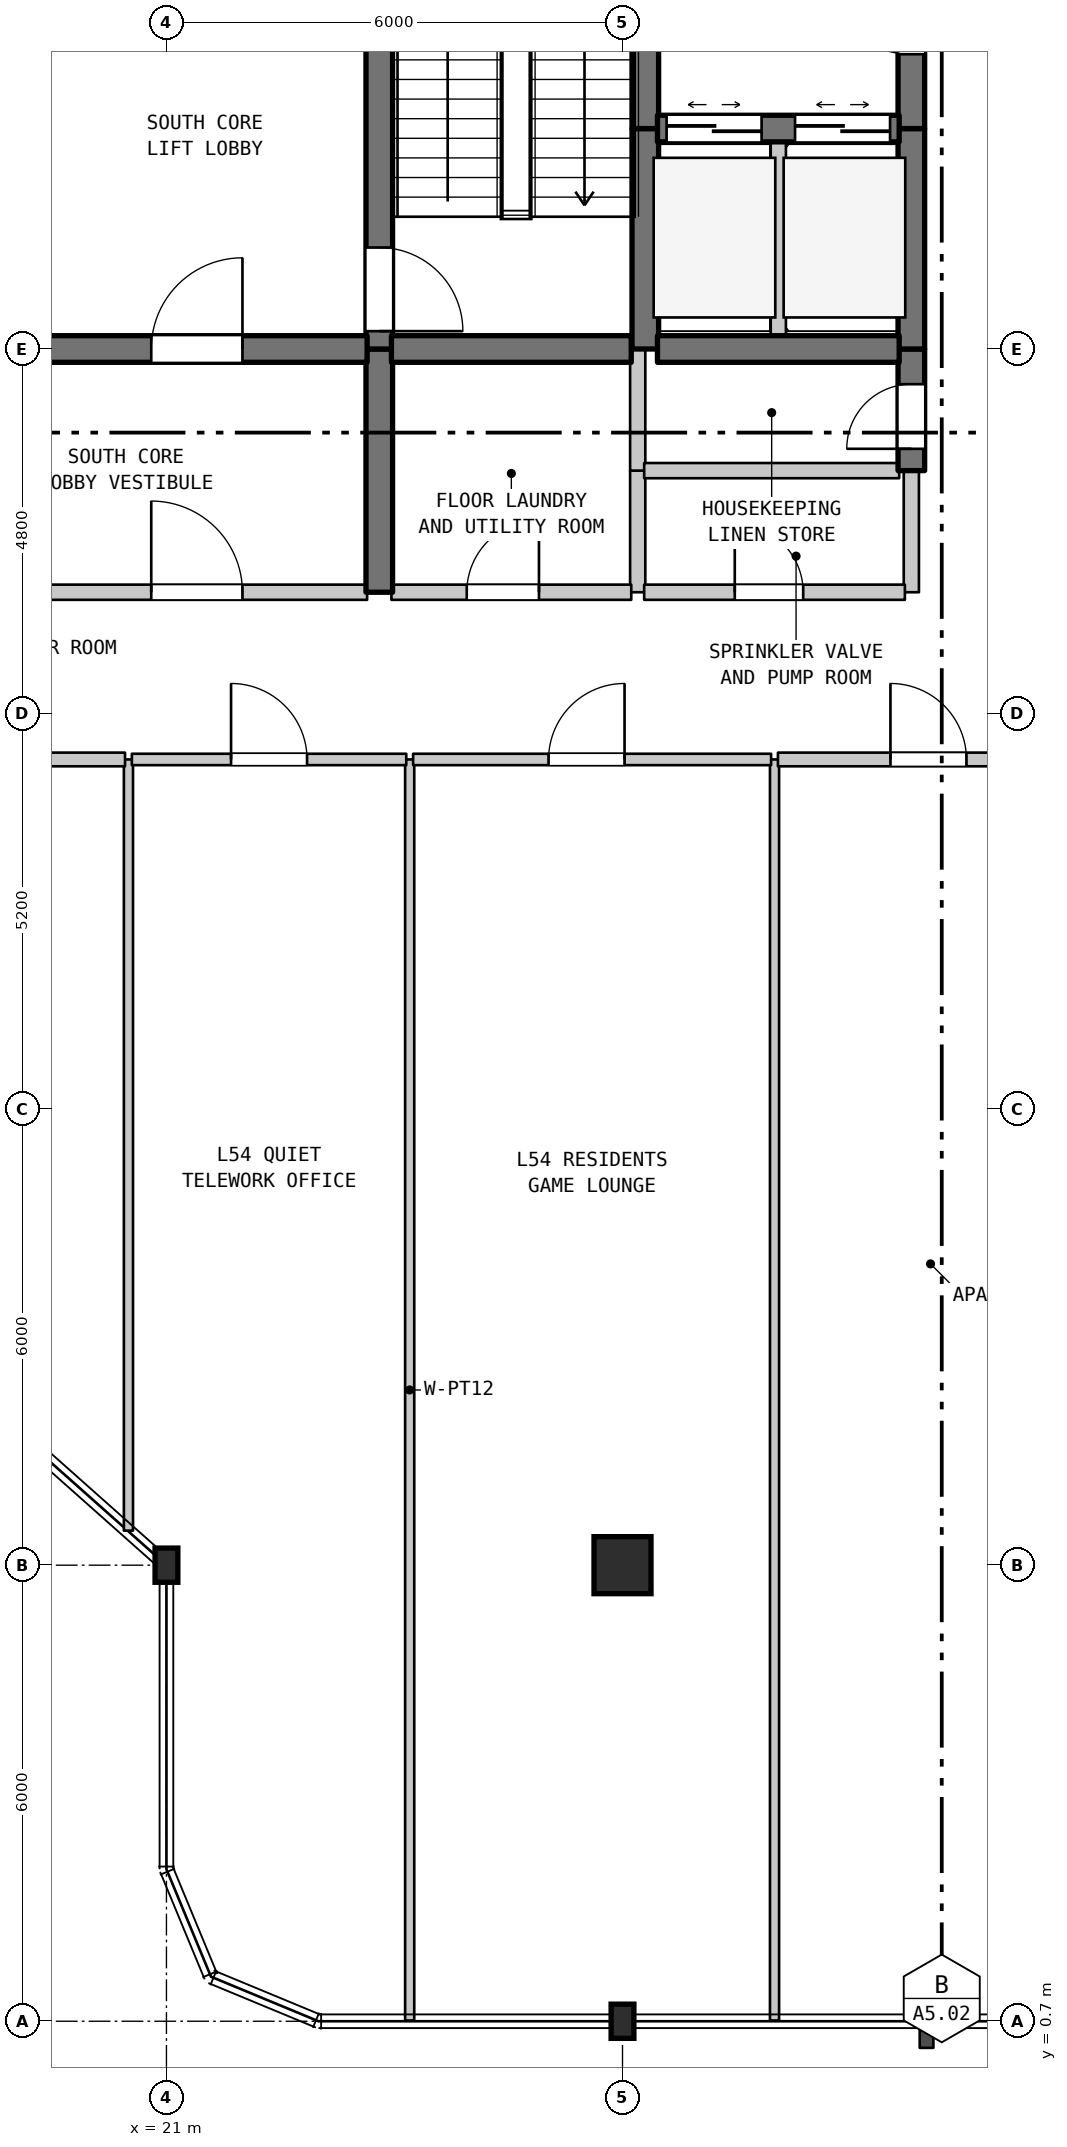
"""IFC4 building model, lengths in metres.
Left out: names, types, materials, properties, quantities, classifications, styles, units other than length and angle.
Written with IfcOpenShell. Run it as: python <this file> out.ifc"""

import sys

from ifc_helpers import new_model, si_unit, direction, frame, frame_2d, origin, origin_2d, place, context, subcontext, project, spatial, rectangle, i_section, extrude, element, fill, save


model = new_model("IFC4")
c1 = context("Model", 3, precision=1e-05, world=origin(), true_north=direction((0.0, 1.0)))
c2 = subcontext(c1, "Body", "Model", "MODEL_VIEW")
j1 = project(units=[si_unit("LENGTHUNIT", "METRE"), si_unit("PLANEANGLEUNIT", "RADIAN")], contexts=[c1])
p1 = place(None, origin())
s1 = spatial("IfcSite", under=j1, at=p1, CompositionType="ELEMENT")
p2 = place(p1, origin())
s2 = spatial("IfcBuilding", under=s1, at=p2, CompositionType="ELEMENT")
p3 = place(p2, frame((0.0, 0.0, 218.0)))
s3 = spatial("IfcBuildingStorey", under=s2, at=p3, CompositionType="ELEMENT", Elevation=218.0)
for number, where, z_axis, x_axis in (
    (1, (21.0, 6.7, 0.0), (0.0, 0.0, 1.0), (1.0, 0.0, 0.0)),
    (2, (27.0, 0.7, 0.0), (0.0, 0.0, 1.0), (1.0, 0.0, 0.0)),
):
    element("IfcColumn", number, at=place(p3, frame(where, z_axis=z_axis, x_axis=x_axis)), inside=s3, PredefinedType="COLUMN", context=c2, shape_type="SweptSolid", body=[
        extrude(i_section(OverallWidth=0.3, OverallDepth=0.45, WebThickness=0.014, FlangeThickness=0.026, FilletRadius=0.027, at=origin_2d()), origin(), (0.0, 0.0, 1.0), 4.8),
    ])
p4 = place(p3, frame((27.0, 6.7, 0.0), z_axis=(0.0, 0.0, 1.0), x_axis=(1.0, 0.0, 0.0)))
e3 = element("IfcColumn", 3, at=p4, inside=s3, PredefinedType="COLUMN", context=c2, shape_type="SweptSolid", body=[
    extrude(rectangle(XDim=0.75, YDim=0.75, at=origin_2d()), origin(), (0.0, 0.0, 1.0), 4.8),
])
p5 = place(p3, frame((20.5, 7.154, 0.0), z_axis=(0.0, 0.0, 1.0), x_axis=(0.0, 1.0, 0.0)))
e4 = element("IfcWall", 4, at=p5, inside=s3, PredefinedType="PARTITIONING", context=c2, shape_type="SweptSolid", body=[
    extrude(rectangle(XDim=10.146, YDim=0.12, at=frame_2d((5.073, 0.0))), origin(), (0.0, 0.0, 1.0), 4.49),
])
p6 = place(p3, frame((23.8, 19.5, 0.0), z_axis=(0.0, 0.0, 1.0), x_axis=(0.0, 1.0, 0.0)))
e5 = element("IfcWall", 5, at=p6, inside=s3, PredefinedType="SHEAR", context=c2, shape_type="SweptSolid", body=[
    extrude(rectangle(XDim=3.2, YDim=0.35, at=frame_2d((1.6, 0.0))), origin(), (0.0, 0.0, 1.0), 4.49),
])
p7 = place(p3, frame((23.8, 22.7, 0.0), z_axis=(0.0, 0.0, 1.0), x_axis=(0.0, 1.0, 0.0)))
e6 = element("IfcWall", 6, at=p7, inside=s3, PredefinedType="SHEAR", context=c2, shape_type="SweptSolid", body=[
    extrude(rectangle(XDim=5.5, YDim=0.35, at=frame_2d((2.75, 0.0))), origin(), (0.0, 0.0, 1.0), 4.49),
])
p8 = place(p7, frame((0.235, 0.0, 0.0)))
e7 = element("IfcOpeningElement", 7, at=p8, cuts=e6, PredefinedType="OPENING", context=c2, shape_type="SweptSolid", body=[
    extrude(rectangle(XDim=1.1, YDim=2.15, at=frame_2d((0.55, 1.075))), frame((0.0, 0.185, 0.0), z_axis=(0.0, -1.0, 0.0), x_axis=(1.0, 0.0, 0.0)), (0.0, 0.0, 1.0), 0.37),
])
p9 = place(p3, frame((24.2, 0.71, 0.0), z_axis=(0.0, 0.0, 1.0), x_axis=(0.0, 1.0, 0.0)))
e8 = element("IfcWall", 8, at=p9, inside=s3, PredefinedType="PARTITIONING", context=c2, shape_type="SweptSolid", body=[
    extrude(rectangle(XDim=16.59, YDim=0.12, at=frame_2d((8.295, 0.0))), origin(), (0.0, 0.0, 1.0), 4.49),
])
p10 = place(p3, frame((27.2, 19.5, 0.0), z_axis=(0.0, 0.0, 1.0), x_axis=(0.0, 1.0, 0.0)))
e9 = element("IfcWall", 9, at=p10, inside=s3, PredefinedType="STANDARD", context=c2, shape_type="SweptSolid", body=[
    extrude(rectangle(XDim=1.6, YDim=0.2, at=frame_2d((0.8, 0.0))), origin(), (0.0, 0.0, 1.0), 4.49),
])
p11 = place(p3, frame((27.2, 21.1, 0.0), z_axis=(0.0, 0.0, 1.0), x_axis=(0.0, 1.0, 0.0)))
e10 = element("IfcWall", 10, at=p11, inside=s3, PredefinedType="STANDARD", context=c2, shape_type="SweptSolid", body=[
    extrude(rectangle(XDim=1.6, YDim=0.2, at=frame_2d((0.8, 0.0))), origin(), (0.0, 0.0, 1.0), 4.49),
])
p12 = place(p3, frame((27.3, 22.7, 0.0), z_axis=(0.0, 0.0, 1.0), x_axis=(0.0, 1.0, 0.0)))
e11 = element("IfcWall", 11, at=p12, inside=s3, PredefinedType="SHEAR", context=c2, shape_type="SweptSolid", body=[
    extrude(rectangle(XDim=2.9, YDim=0.35, at=frame_2d((1.45, 0.0))), origin(), (0.0, 0.0, 1.0), 4.49),
])
p13 = place(p3, frame((27.3, 25.6, 0.0), z_axis=(0.0, 0.0, 1.0), x_axis=(0.0, 1.0, 0.0)))
e12 = element("IfcWall", 12, at=p13, inside=s3, PredefinedType="SHEAR", context=c2, shape_type="SweptSolid", body=[
    extrude(rectangle(XDim=3.3, YDim=0.35, at=frame_2d((1.65, 0.0))), origin(), (0.0, 0.0, 1.0), 4.49),
])
p14 = place(p3, frame((29.0, 0.71, 0.0), z_axis=(0.0, 0.0, 1.0), x_axis=(0.0, 1.0, 0.0)))
e13 = element("IfcWall", 13, at=p14, inside=s3, PredefinedType="PARTITIONING", context=c2, shape_type="SweptSolid", body=[
    extrude(rectangle(XDim=16.59, YDim=0.12, at=frame_2d((8.295, 0.0))), origin(), (0.0, 0.0, 1.0), 4.49),
])
p15 = place(p3, frame((29.05, 22.7, 0.0), z_axis=(0.0, 0.0, 1.0), x_axis=(0.0, 1.0, 0.0)))
e14 = element("IfcWall", 14, at=p15, inside=s3, PredefinedType="STANDARD", context=c2, shape_type="SweptSolid", body=[
    extrude(rectangle(XDim=2.9, YDim=0.2, at=frame_2d((1.45, 0.0))), origin(), (0.0, 0.0, 1.0), 4.49),
])
p16 = place(p3, frame((30.8, 19.5, 0.0), z_axis=(0.0, 0.0, 1.0), x_axis=(0.0, 1.0, 0.0)))
e15 = element("IfcWall", 15, at=p16, inside=s3, PredefinedType="STANDARD", context=c2, shape_type="SweptSolid", body=[
    extrude(rectangle(XDim=1.6, YDim=0.2, at=frame_2d((0.8, 0.0))), origin(), (0.0, 0.0, 1.0), 4.49),
])
p17 = place(p3, frame((30.8, 21.1, 0.0), z_axis=(0.0, 0.0, 1.0), x_axis=(0.0, 1.0, 0.0)))
e16 = element("IfcWall", 16, at=p17, inside=s3, PredefinedType="SHEAR", context=c2, shape_type="SweptSolid", body=[
    extrude(rectangle(XDim=1.6, YDim=0.35, at=frame_2d((0.8, 0.0))), origin(), (0.0, 0.0, 1.0), 4.49),
])
p18 = place(p17, frame((0.287, 0.0, 0.0)))
e17 = element("IfcOpeningElement", 17, at=p18, cuts=e16, PredefinedType="OPENING", context=c2, shape_type="SweptSolid", body=[
    extrude(rectangle(XDim=0.85, YDim=2.1, at=frame_2d((0.425, 1.05))), frame((0.0, 0.185, 0.0), z_axis=(0.0, -1.0, 0.0), x_axis=(1.0, 0.0, 0.0)), (0.0, 0.0, 1.0), 0.37),
])
p19 = place(p3, frame((30.8, 22.7, 0.0), z_axis=(0.0, 0.0, 1.0), x_axis=(0.0, 1.0, 0.0)))
e18 = element("IfcWall", 18, at=p19, inside=s3, PredefinedType="SHEAR", context=c2, shape_type="SweptSolid", body=[
    extrude(rectangle(XDim=2.9, YDim=0.35, at=frame_2d((1.45, 0.0))), origin(), (0.0, 0.0, 1.0), 4.49),
])
p20 = place(p3, frame((30.8, 25.6, 0.0), z_axis=(0.0, 0.0, 1.0), x_axis=(0.0, 1.0, 0.0)))
e19 = element("IfcWall", 19, at=p20, inside=s3, PredefinedType="SHEAR", context=c2, shape_type="SweptSolid", body=[
    extrude(rectangle(XDim=3.3, YDim=0.35, at=frame_2d((1.65, 0.0))), origin(), (0.0, 0.0, 1.0), 4.49),
])
p21 = place(p20, frame((0.978, 0.0, 0.0)))
e20 = element("IfcOpeningElement", 20, at=p21, cuts=e19, PredefinedType="OPENING", context=c2, shape_type="SweptSolid", body=[
    extrude(rectangle(XDim=1.2, YDim=2.2, at=frame_2d((0.6, 1.1))), frame((0.0, 0.185, 0.0), z_axis=(0.0, -1.0, 0.0), x_axis=(1.0, 0.0, 0.0)), (0.0, 0.0, 1.0), 0.37),
])
p22 = place(p3, frame((18.595, 17.3, 0.0), z_axis=(0.0, 0.0, 1.0), x_axis=(1.0, 0.0, 0.0)))
e21 = element("IfcWall", 21, at=p22, inside=s3, PredefinedType="STANDARD", context=c2, shape_type="SweptSolid", body=[
    extrude(rectangle(XDim=1.86, YDim=0.18, at=frame_2d((0.93, 0.0))), origin(), (0.0, 0.0, 1.0), 4.49),
])
p23 = place(p3, frame((20.545, 17.3, 0.0), z_axis=(0.0, 0.0, 1.0), x_axis=(1.0, 0.0, 0.0)))
e22 = element("IfcWall", 22, at=p23, inside=s3, PredefinedType="STANDARD", context=c2, shape_type="SweptSolid", body=[
    extrude(rectangle(XDim=3.61, YDim=0.15, at=frame_2d((1.805, 0.0))), origin(), (0.0, 0.0, 1.0), 4.49),
])
p24 = place(p23, frame((1.305, 0.0, 0.0)))
e23 = element("IfcOpeningElement", 23, at=p24, cuts=e22, PredefinedType="OPENING", context=c2, shape_type="SweptSolid", body=[
    extrude(rectangle(XDim=1.0, YDim=2.15, at=frame_2d((0.5, 1.075))), frame((0.0, 0.085, 0.0), z_axis=(0.0, -1.0, 0.0), x_axis=(1.0, 0.0, 0.0)), (0.0, 0.0, 1.0), 0.17),
])
p25 = place(p3, frame((24.245, 17.3, 0.0), z_axis=(0.0, 0.0, 1.0), x_axis=(1.0, 0.0, 0.0)))
e24 = element("IfcWall", 24, at=p25, inside=s3, PredefinedType="STANDARD", context=c2, shape_type="SweptSolid", body=[
    extrude(rectangle(XDim=4.71, YDim=0.15, at=frame_2d((2.355, 0.0))), origin(), (0.0, 0.0, 1.0), 4.49),
])
p26 = place(p25, frame((1.782, 0.0, 0.0)))
e25 = element("IfcOpeningElement", 25, at=p26, cuts=e24, PredefinedType="OPENING", context=c2, shape_type="SweptSolid", body=[
    extrude(rectangle(XDim=1.0, YDim=2.15, at=frame_2d((0.5, 1.075))), frame((0.0, 0.085, 0.0), z_axis=(0.0, -1.0, 0.0), x_axis=(1.0, 0.0, 0.0)), (0.0, 0.0, 1.0), 0.17),
])
p27 = place(p3, frame((29.045, 17.3, 0.0), z_axis=(0.0, 0.0, 1.0), x_axis=(1.0, 0.0, 0.0)))
e26 = element("IfcWall", 26, at=p27, inside=s3, PredefinedType="STANDARD", context=c2, shape_type="SweptSolid", body=[
    extrude(rectangle(XDim=3.96, YDim=0.18, at=frame_2d((1.98, 0.0))), origin(), (0.0, 0.0, 1.0), 4.49),
])
p28 = place(p27, frame((1.48, 0.0, 0.0)))
e27 = element("IfcOpeningElement", 27, at=p28, cuts=e26, PredefinedType="OPENING", context=c2, shape_type="SweptSolid", body=[
    extrude(rectangle(XDim=1.0, YDim=2.15, at=frame_2d((0.5, 1.075))), frame((0.0, 0.1, 0.0), z_axis=(0.0, -1.0, 0.0), x_axis=(1.0, 0.0, 0.0)), (0.0, 0.0, 1.0), 0.2),
])
p29 = place(p3, frame((19.16, 19.5, 0.0), z_axis=(0.0, 0.0, 1.0), x_axis=(1.0, 0.0, 0.0)))
e28 = element("IfcWall", 28, at=p29, inside=s3, PredefinedType="STANDARD", context=c2, shape_type="SweptSolid", body=[
    extrude(rectangle(XDim=4.48, YDim=0.2, at=frame_2d((2.24, 0.0))), origin(), (0.0, 0.0, 1.0), 4.49),
])
p30 = place(p29, frame((1.64, 0.0, 0.0)))
e29 = element("IfcOpeningElement", 29, at=p30, cuts=e28, PredefinedType="OPENING", context=c2, shape_type="SweptSolid", body=[
    extrude(rectangle(XDim=1.2, YDim=2.2, at=frame_2d((0.6, 1.1))), frame((0.0, 0.11, 0.0), z_axis=(0.0, -1.0, 0.0), x_axis=(1.0, 0.0, 0.0)), (0.0, 0.0, 1.0), 0.22),
])
p31 = place(p3, frame((23.96, 19.5, 0.0), z_axis=(0.0, 0.0, 1.0), x_axis=(1.0, 0.0, 0.0)))
e30 = element("IfcWall", 30, at=p31, inside=s3, PredefinedType="STANDARD", context=c2, shape_type="SweptSolid", body=[
    extrude(rectangle(XDim=3.155, YDim=0.2, at=frame_2d((1.578, 0.0))), origin(), (0.0, 0.0, 1.0), 4.49),
])
p32 = place(p31, frame((0.991, 0.0, 0.0)))
e31 = element("IfcOpeningElement", 31, at=p32, cuts=e30, PredefinedType="OPENING", context=c2, shape_type="SweptSolid", body=[
    extrude(rectangle(XDim=0.95, YDim=2.15, at=frame_2d((0.475, 1.075))), frame((0.0, 0.11, 0.0), z_axis=(0.0, -1.0, 0.0), x_axis=(1.0, 0.0, 0.0)), (0.0, 0.0, 1.0), 0.22),
])
p33 = place(p3, frame((27.285, 19.5, 0.0), z_axis=(0.0, 0.0, 1.0), x_axis=(1.0, 0.0, 0.0)))
e32 = element("IfcWall", 32, at=p33, inside=s3, PredefinedType="STANDARD", context=c2, shape_type="SweptSolid", body=[
    extrude(rectangle(XDim=3.43, YDim=0.2, at=frame_2d((1.715, 0.0))), origin(), (0.0, 0.0, 1.0), 4.49),
])
p34 = place(p33, frame((1.192, 0.0, 0.0)))
e33 = element("IfcOpeningElement", 33, at=p34, cuts=e32, PredefinedType="OPENING", context=c2, shape_type="SweptSolid", body=[
    extrude(rectangle(XDim=0.9, YDim=2.15, at=frame_2d((0.45, 1.075))), frame((0.0, 0.11, 0.0), z_axis=(0.0, -1.0, 0.0), x_axis=(1.0, 0.0, 0.0)), (0.0, 0.0, 1.0), 0.22),
])
p35 = place(p3, frame((27.285, 21.1, 0.0), z_axis=(0.0, 0.0, 1.0), x_axis=(1.0, 0.0, 0.0)))
e34 = element("IfcWall", 34, at=p35, inside=s3, PredefinedType="STANDARD", context=c2, shape_type="SweptSolid", body=[
    extrude(rectangle(XDim=3.355, YDim=0.2, at=frame_2d((1.677, 0.0))), origin(), (0.0, 0.0, 1.0), 4.49),
])
p36 = place(p3, frame((19.16, 22.7, 0.0), z_axis=(0.0, 0.0, 1.0), x_axis=(1.0, 0.0, 0.0)))
e35 = element("IfcWall", 35, at=p36, inside=s3, PredefinedType="SHEAR", context=c2, shape_type="SweptSolid", body=[
    extrude(rectangle(XDim=4.48, YDim=0.35, at=frame_2d((2.24, 0.0))), origin(), (0.0, 0.0, 1.0), 4.49),
])
p37 = place(p36, frame((1.64, 0.0, 0.0)))
e36 = element("IfcOpeningElement", 36, at=p37, cuts=e35, PredefinedType="OPENING", context=c2, shape_type="SweptSolid", body=[
    extrude(rectangle(XDim=1.2, YDim=2.2, at=frame_2d((0.6, 1.1))), frame((0.0, 0.185, 0.0), z_axis=(0.0, -1.0, 0.0), x_axis=(1.0, 0.0, 0.0)), (0.0, 0.0, 1.0), 0.37),
])
p38 = place(p3, frame((23.96, 22.7, 0.0), z_axis=(0.0, 0.0, 1.0), x_axis=(1.0, 0.0, 0.0)))
e37 = element("IfcWall", 37, at=p38, inside=s3, PredefinedType="SHEAR", context=c2, shape_type="SweptSolid", body=[
    extrude(rectangle(XDim=3.155, YDim=0.35, at=frame_2d((1.578, 0.0))), origin(), (0.0, 0.0, 1.0), 4.49),
])
p39 = place(p3, frame((27.46, 22.7, 0.0), z_axis=(0.0, 0.0, 1.0), x_axis=(1.0, 0.0, 0.0)))
e38 = element("IfcWall", 38, at=p39, inside=s3, PredefinedType="SHEAR", context=c2, shape_type="SweptSolid", body=[
    extrude(rectangle(XDim=3.18, YDim=0.35, at=frame_2d((1.59, 0.0))), origin(), (0.0, 0.0, 1.0), 4.49),
])
p40 = place(p3, frame((27.46, 25.6, 0.0), z_axis=(0.0, 0.0, 1.0), x_axis=(1.0, 0.0, 0.0)))
e39 = element("IfcWall", 39, at=p40, inside=s3, PredefinedType="SHEAR", context=c2, shape_type="SweptSolid", body=[
    extrude(rectangle(XDim=3.18, YDim=0.35, at=frame_2d((1.59, 0.0))), origin(), (0.0, 0.0, 1.0), 4.49),
])
p41 = place(p40, frame((0.12, 0.0, 0.0)))
e40 = element("IfcOpeningElement", 40, at=p41, cuts=e39, PredefinedType="OPENING", context=c2, shape_type="SweptSolid", body=[
    extrude(rectangle(XDim=1.25, YDim=2.2, at=frame_2d((0.625, 1.1))), frame((0.0, 0.185, 0.0), z_axis=(0.0, -1.0, 0.0), x_axis=(1.0, 0.0, 0.0)), (0.0, 0.0, 1.0), 0.37),
])
p42 = place(p40, frame((1.81, 0.0, 0.0)))
e41 = element("IfcOpeningElement", 41, at=p42, cuts=e39, PredefinedType="OPENING", context=c2, shape_type="SweptSolid", body=[
    extrude(rectangle(XDim=1.25, YDim=2.2, at=frame_2d((0.625, 1.1))), frame((0.0, 0.185, 0.0), z_axis=(0.0, -1.0, 0.0), x_axis=(1.0, 0.0, 0.0)), (0.0, 0.0, 1.0), 0.37),
])
p43 = place(p8, frame((1.1, 0.0, 0.0), z_axis=(0.0, 0.0, 1.0), x_axis=(-1.0, 0.0, 0.0)))
e42 = element("IfcDoor", 42, at=p43, inside=s3, OperationType="SINGLE_SWING_LEFT", PredefinedType="DOOR", context=c2, shape_type="SweptSolid", body=[
    extrude(rectangle(XDim=1.1, YDim=2.15, at=frame_2d((0.55, 1.075))), frame((0.0, 0.025, 0.0), z_axis=(0.0, -1.0, 0.0), x_axis=(1.0, 0.0, 0.0)), (0.0, 0.0, 1.0), 0.05),
])
fill(e7, e42)
p44 = place(p18, origin())
e43 = element("IfcDoor", 43, at=p44, inside=s3, OperationType="SINGLE_SWING_LEFT", PredefinedType="DOOR", context=c2, shape_type="SweptSolid", body=[
    extrude(rectangle(XDim=0.85, YDim=2.1, at=frame_2d((0.425, 1.05))), frame((0.0, 0.025, 0.0), z_axis=(0.0, -1.0, 0.0), x_axis=(1.0, 0.0, 0.0)), (0.0, 0.0, 1.0), 0.05),
])
fill(e17, e43)
p45 = place(p21, origin())
e44 = element("IfcDoor", 44, at=p45, inside=s3, OperationType="SINGLE_SWING_RIGHT", PredefinedType="DOOR", context=c2, shape_type="SweptSolid", body=[
    extrude(rectangle(XDim=1.2, YDim=2.2, at=frame_2d((0.6, 1.1))), frame((0.0, 0.025, 0.0), z_axis=(0.0, -1.0, 0.0), x_axis=(1.0, 0.0, 0.0)), (0.0, 0.0, 1.0), 0.05),
])
fill(e20, e44)
p46 = place(p24, origin())
e45 = element("IfcDoor", 45, at=p46, inside=s3, OperationType="SINGLE_SWING_LEFT", PredefinedType="DOOR", context=c2, shape_type="SweptSolid", body=[
    extrude(rectangle(XDim=1.0, YDim=2.15, at=frame_2d((0.5, 1.075))), frame((0.0, 0.025, 0.0), z_axis=(0.0, -1.0, 0.0), x_axis=(1.0, 0.0, 0.0)), (0.0, 0.0, 1.0), 0.05),
])
fill(e23, e45)
p47 = place(p26, origin())
e46 = element("IfcDoor", 46, at=p47, inside=s3, OperationType="SINGLE_SWING_RIGHT", PredefinedType="DOOR", context=c2, shape_type="SweptSolid", body=[
    extrude(rectangle(XDim=1.0, YDim=2.15, at=frame_2d((0.5, 1.075))), frame((0.0, 0.025, 0.0), z_axis=(0.0, -1.0, 0.0), x_axis=(1.0, 0.0, 0.0)), (0.0, 0.0, 1.0), 0.05),
])
fill(e25, e46)
p48 = place(p28, origin())
e47 = element("IfcDoor", 47, at=p48, inside=s3, OperationType="SINGLE_SWING_LEFT", PredefinedType="DOOR", context=c2, shape_type="SweptSolid", body=[
    extrude(rectangle(XDim=1.0, YDim=2.15, at=frame_2d((0.5, 1.075))), frame((0.0, 0.025, 0.0), z_axis=(0.0, -1.0, 0.0), x_axis=(1.0, 0.0, 0.0)), (0.0, 0.0, 1.0), 0.05),
])
fill(e27, e47)
p49 = place(p30, origin())
e48 = element("IfcDoor", 48, at=p49, inside=s3, OperationType="SINGLE_SWING_LEFT", PredefinedType="DOOR", context=c2, shape_type="SweptSolid", body=[
    extrude(rectangle(XDim=1.2, YDim=2.2, at=frame_2d((0.6, 1.1))), frame((0.0, 0.025, 0.0), z_axis=(0.0, -1.0, 0.0), x_axis=(1.0, 0.0, 0.0)), (0.0, 0.0, 1.0), 0.05),
])
fill(e29, e48)
p50 = place(p32, origin())
e49 = element("IfcDoor", 49, at=p50, inside=s3, OperationType="SINGLE_SWING_RIGHT", PredefinedType="DOOR", context=c2, shape_type="SweptSolid", body=[
    extrude(rectangle(XDim=0.95, YDim=2.15, at=frame_2d((0.475, 1.075))), frame((0.0, 0.025, 0.0), z_axis=(0.0, -1.0, 0.0), x_axis=(1.0, 0.0, 0.0)), (0.0, 0.0, 1.0), 0.05),
])
fill(e31, e49)
p51 = place(p34, origin())
e50 = element("IfcDoor", 50, at=p51, inside=s3, OperationType="SINGLE_SWING_LEFT", PredefinedType="DOOR", context=c2, shape_type="SweptSolid", body=[
    extrude(rectangle(XDim=0.9, YDim=2.15, at=frame_2d((0.45, 1.075))), frame((0.0, 0.025, 0.0), z_axis=(0.0, -1.0, 0.0), x_axis=(1.0, 0.0, 0.0)), (0.0, 0.0, 1.0), 0.05),
])
fill(e33, e50)
p52 = place(p37, origin())
e51 = element("IfcDoor", 51, at=p52, inside=s3, OperationType="SINGLE_SWING_RIGHT", PredefinedType="DOOR", context=c2, shape_type="SweptSolid", body=[
    extrude(rectangle(XDim=1.2, YDim=2.2, at=frame_2d((0.6, 1.1))), frame((0.0, 0.025, 0.0), z_axis=(0.0, -1.0, 0.0), x_axis=(1.0, 0.0, 0.0)), (0.0, 0.0, 1.0), 0.05),
])
fill(e36, e51)
p53 = place(p41, origin())
e52 = element("IfcDoor", 52, at=p53, inside=s3, OperationType="DOUBLE_DOOR_SLIDING", PredefinedType="DOOR", context=c2, shape_type="SweptSolid", body=[
    extrude(rectangle(XDim=1.25, YDim=2.2, at=frame_2d((0.625, 1.1))), frame((0.0, 0.025, 0.0), z_axis=(0.0, -1.0, 0.0), x_axis=(1.0, 0.0, 0.0)), (0.0, 0.0, 1.0), 0.05),
])
fill(e40, e52)
p54 = place(p42, origin())
e53 = element("IfcDoor", 53, at=p54, inside=s3, OperationType="DOUBLE_DOOR_SLIDING", PredefinedType="DOOR", context=c2, shape_type="SweptSolid", body=[
    extrude(rectangle(XDim=1.25, YDim=2.2, at=frame_2d((0.625, 1.1))), frame((0.0, 0.025, 0.0), z_axis=(0.0, -1.0, 0.0), x_axis=(1.0, 0.0, 0.0)), (0.0, 0.0, 1.0), 0.05),
])
fill(e41, e53)
save(model, sys.argv[1])
